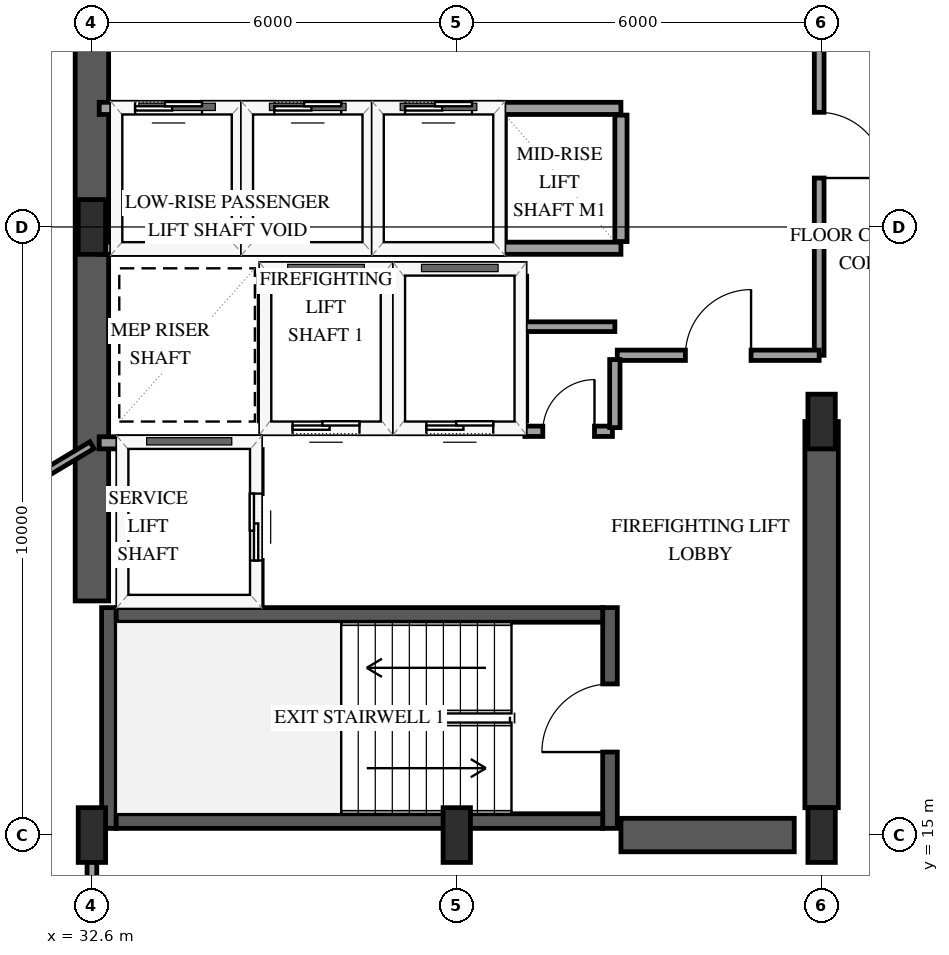
"""IFC4 building model, lengths in metres.
Left out: names, types, materials, properties, quantities, classifications, styles, units other than length and angle.
Written with IfcOpenShell. Run it as: python <this file> out.ifc"""

import sys

from ifc_helpers import new_model, si_unit, direction, frame, frame_2d, origin, origin_2d, place, context, subcontext, project, spatial, rectangle, extrude, element, fill, save


model = new_model("IFC4")
c1 = context("Model", 3, precision=1e-05, world=origin(), true_north=direction((0.0, 1.0)))
c2 = subcontext(c1, "Body", "Model", "MODEL_VIEW")
j1 = project(units=[si_unit("LENGTHUNIT", "METRE"), si_unit("PLANEANGLEUNIT", "RADIAN")], contexts=[c1])
p1 = place(None, origin())
s1 = spatial("IfcSite", under=j1, at=p1, CompositionType="ELEMENT")
p2 = place(p1, origin())
s2 = spatial("IfcBuilding", under=s1, at=p2, CompositionType="ELEMENT")
p3 = place(p2, frame((0.0, 0.0, 118.6)))
s3 = spatial("IfcBuildingStorey", under=s2, at=p3, CompositionType="ELEMENT", Elevation=118.6)
p4 = place(p3, frame((32.88, 15.11, 0.0), z_axis=(0.0, 0.0, 1.0), x_axis=(0.0, 1.0, 0.0)))
e1 = element("IfcWall", 1, at=p4, inside=s3, PredefinedType="SHEAR", context=c2, shape_type="SweptSolid", body=[
    extrude(rectangle(XDim=3.63, YDim=0.24, at=frame_2d((1.815, 0.0))), origin(), (0.0, 0.0, 1.0), 3.9),
])
p5 = place(p3, frame((41.12, 15.11, 0.0), z_axis=(0.0, 0.0, 1.0), x_axis=(0.0, 1.0, 0.0)))
e2 = element("IfcWall", 2, at=p5, inside=s3, PredefinedType="SHEAR", context=c2, shape_type="SweptSolid", body=[
    extrude(rectangle(XDim=3.63, YDim=0.24, at=frame_2d((1.815, 0.0))), origin(), (0.0, 0.0, 1.0), 3.9),
])
p6 = place(p5, frame((1.255, 0.0, 0.0)))
e3 = element("IfcOpeningElement", 3, at=p6, cuts=e2, PredefinedType="OPENING", context=c2, shape_type="SweptSolid", body=[
    extrude(rectangle(XDim=1.12, YDim=2.15, at=frame_2d((0.56, 1.075))), frame((0.0, 0.13, 0.0), z_axis=(0.0, -1.0, 0.0), x_axis=(1.0, 0.0, 0.0)), (0.0, 0.0, 1.0), 0.26),
])
for number, where, z_axis, x_axis in (
    (4, (33.0, 15.23, 0.0), (0.0, 0.0, 1.0), (1.0, 0.0, 0.0)),
    (5, (33.0, 18.62, 0.0), (0.0, 0.0, 1.0), (1.0, 0.0, 0.0)),
):
    element("IfcWall", number, at=place(p3, frame(where, z_axis=z_axis, x_axis=x_axis)), inside=s3, PredefinedType="SHEAR", context=c2, shape_type="SweptSolid", body=[
        extrude(rectangle(XDim=8.0, YDim=0.24, at=frame_2d((4.0, 0.0))), origin(), (0.0, 0.0, 1.0), 3.9),
    ])
p7 = place(p3, frame((32.6, 18.85, 0.0), z_axis=(0.0, 0.0, 1.0), x_axis=(0.0, 1.0, 0.0)))
e6 = element("IfcWall", 6, at=p7, inside=s3, PredefinedType="SHEAR", context=c2, shape_type="SweptSolid", body=[
    extrude(rectangle(XDim=12.3, YDim=0.55, at=frame_2d((6.15, 0.0))), origin(), (0.0, 0.0, 1.0), 3.9),
])
p8 = place(p3, frame((41.3, 15.0, 0.0), z_axis=(0.0, 0.0, 1.0), x_axis=(1.0, 0.0, 0.0)))
e7 = element("IfcWall", 7, at=p8, inside=s3, PredefinedType="SHEAR", context=c2, shape_type="SweptSolid", body=[
    extrude(rectangle(XDim=2.85, YDim=0.55, at=frame_2d((1.425, 0.0))), origin(), (0.0, 0.0, 1.0), 3.9),
])
p9 = place(p3, frame((44.6, 15.45, 0.0), z_axis=(0.0, 0.0, 1.0), x_axis=(0.0, 1.0, 0.0)))
e8 = element("IfcWall", 8, at=p9, inside=s3, PredefinedType="SHEAR", context=c2, shape_type="SweptSolid", body=[
    extrude(rectangle(XDim=6.35, YDim=0.55, at=frame_2d((3.175, 0.0))), origin(), (0.0, 0.0, 1.0), 3.9),
])
for number, where, z_axis, x_axis in (
    (9, (32.6, 15.0, 0.0), (0.0, 0.0, 1.0), (1.0, 0.0, 0.0)),
    (10, (32.6, 25.0, 0.0), (0.0, 0.0, 1.0), (1.0, 0.0, 0.0)),
    (11, (38.6, 15.0, 0.0), (0.0, 0.0, 1.0), (1.0, 0.0, 0.0)),
    (12, (44.6, 15.0, 0.0), (0.0, 0.0, 1.0), (1.0, 0.0, 0.0)),
    (13, (44.6, 21.8, 0.0), (0.0, 0.0, 1.0), (1.0, 0.0, 0.0)),
):
    element("IfcColumn", number, at=place(p3, frame(where, z_axis=z_axis, x_axis=x_axis)), inside=s3, PredefinedType="PILASTER", context=c2, shape_type="SweptSolid", body=[
        extrude(rectangle(XDim=0.45, YDim=0.9, at=origin_2d()), origin(), (0.0, 0.0, 1.0), 3.9),
    ])
p10 = place(p3, frame((35.45, 21.7, 0.0), z_axis=(0.0, 0.0, 1.0), x_axis=(1.0, 0.0, 0.0)))
e14 = element("IfcWall", 14, at=p10, inside=s3, PredefinedType="SOLIDWALL", context=c2, shape_type="SweptSolid", body=[
    extrude(rectangle(XDim=2.0, YDim=0.2, at=frame_2d((1.0, 0.0))), origin(), (0.0, 0.0, 1.0), 3.6),
])
p11 = place(p10, frame((0.45, 0.0, 0.0)))
e15 = element("IfcOpeningElement", 15, at=p11, cuts=e14, PredefinedType="OPENING", context=c2, shape_type="SweptSolid", body=[
    extrude(rectangle(XDim=1.1, YDim=2.15, at=frame_2d((0.55, 1.075))), frame((0.0, 0.11, 0.0), z_axis=(0.0, -1.0, 0.0), x_axis=(1.0, 0.0, 0.0)), (0.0, 0.0, 1.0), 0.22),
])
p12 = place(p3, frame((35.45, 24.3, 0.0), z_axis=(0.0, 0.0, 1.0), x_axis=(1.0, 0.0, 0.0)))
e16 = element("IfcWall", 16, at=p12, inside=s3, PredefinedType="SOLIDWALL", context=c2, shape_type="SweptSolid", body=[
    extrude(rectangle(XDim=2.0, YDim=0.2, at=frame_2d((1.0, 0.0))), origin(), (0.0, 0.0, 1.0), 3.6),
])
for number, where, z_axis, x_axis in (
    (17, (35.45, 21.81, 0.0), (0.0, 0.0, 1.0), (0.0, 1.0, 0.0)),
    (18, (37.45, 21.81, 0.0), (0.0, 0.0, 1.0), (0.0, 1.0, 0.0)),
):
    element("IfcWall", number, at=place(p3, frame(where, z_axis=z_axis, x_axis=x_axis)), inside=s3, PredefinedType="SOLIDWALL", context=c2, shape_type="SweptSolid", body=[
        extrude(rectangle(XDim=2.38, YDim=0.2, at=frame_2d((1.19, 0.0))), origin(), (0.0, 0.0, 1.0), 3.6),
    ])
p13 = place(p3, frame((37.65, 21.7, 0.0), z_axis=(0.0, 0.0, 1.0), x_axis=(1.0, 0.0, 0.0)))
e19 = element("IfcWall", 19, at=p13, inside=s3, PredefinedType="SOLIDWALL", context=c2, shape_type="SweptSolid", body=[
    extrude(rectangle(XDim=2.0, YDim=0.2, at=frame_2d((1.0, 0.0))), origin(), (0.0, 0.0, 1.0), 3.6),
])
p14 = place(p13, frame((0.45, 0.0, 0.0)))
e20 = element("IfcOpeningElement", 20, at=p14, cuts=e19, PredefinedType="OPENING", context=c2, shape_type="SweptSolid", body=[
    extrude(rectangle(XDim=1.1, YDim=2.15, at=frame_2d((0.55, 1.075))), frame((0.0, 0.11, 0.0), z_axis=(0.0, -1.0, 0.0), x_axis=(1.0, 0.0, 0.0)), (0.0, 0.0, 1.0), 0.22),
])
p15 = place(p3, frame((37.65, 24.3, 0.0), z_axis=(0.0, 0.0, 1.0), x_axis=(1.0, 0.0, 0.0)))
e21 = element("IfcWall", 21, at=p15, inside=s3, PredefinedType="SOLIDWALL", context=c2, shape_type="SweptSolid", body=[
    extrude(rectangle(XDim=2.0, YDim=0.2, at=frame_2d((1.0, 0.0))), origin(), (0.0, 0.0, 1.0), 3.6),
])
p16 = place(p3, frame((39.65, 21.81, 0.0), z_axis=(0.0, 0.0, 1.0), x_axis=(0.0, 1.0, 0.0)))
e22 = element("IfcWall", 22, at=p16, inside=s3, PredefinedType="SOLIDWALL", context=c2, shape_type="SweptSolid", body=[
    extrude(rectangle(XDim=2.38, YDim=0.2, at=frame_2d((1.19, 0.0))), origin(), (0.0, 0.0, 1.0), 3.6),
])
p17 = place(p3, frame((32.72, 21.45, 0.0), z_axis=(0.0, 0.0, 1.0), x_axis=(1.0, 0.0, 0.0)))
e23 = element("IfcWall", 23, at=p17, inside=s3, PredefinedType="SOLIDWALL", context=c2, shape_type="SweptSolid", body=[
    extrude(rectangle(XDim=2.58, YDim=0.2, at=frame_2d((1.29, 0.0))), origin(), (0.0, 0.0, 1.0), 2.974),
])
p18 = place(p3, frame((35.3, 18.79, 0.0), z_axis=(0.0, 0.0, 1.0), x_axis=(0.0, 1.0, 0.0)))
e24 = element("IfcWall", 24, at=p18, inside=s3, PredefinedType="SOLIDWALL", context=c2, shape_type="SweptSolid", body=[
    extrude(rectangle(XDim=2.55, YDim=0.2, at=frame_2d((1.275, 0.0))), origin(), (0.0, 0.0, 1.0), 3.6),
])
p19 = place(p18, frame((0.725, 0.0, 0.0)))
e25 = element("IfcOpeningElement", 25, at=p19, cuts=e24, PredefinedType="OPENING", context=c2, shape_type="SweptSolid", body=[
    extrude(rectangle(XDim=1.1, YDim=2.15, at=frame_2d((0.55, 1.075))), frame((0.0, 0.11, 0.0), z_axis=(0.0, -1.0, 0.0), x_axis=(1.0, 0.0, 0.0)), (0.0, 0.0, 1.0), 0.22),
])
p20 = place(p3, frame((32.72, 24.65, 0.0), z_axis=(0.0, 0.0, 1.0), x_axis=(1.0, 0.0, 0.0)))
e26 = element("IfcWall", 26, at=p20, inside=s3, PredefinedType="SOLIDWALL", context=c2, shape_type="SweptSolid", body=[
    extrude(rectangle(XDim=2.28, YDim=0.2, at=frame_2d((1.14, 0.0))), origin(), (0.0, 0.0, 1.0), 3.6),
])
p21 = place(p3, frame((32.72, 26.95, 0.0), z_axis=(0.0, 0.0, 1.0), x_axis=(1.0, 0.0, 0.0)))
e27 = element("IfcWall", 27, at=p21, inside=s3, PredefinedType="SOLIDWALL", context=c2, shape_type="SweptSolid", body=[
    extrude(rectangle(XDim=2.28, YDim=0.2, at=frame_2d((1.14, 0.0))), origin(), (0.0, 0.0, 1.0), 3.6),
])
p22 = place(p21, frame((0.59, 0.0, 0.0)))
e28 = element("IfcOpeningElement", 28, at=p22, cuts=e27, PredefinedType="OPENING", context=c2, shape_type="SweptSolid", body=[
    extrude(rectangle(XDim=1.1, YDim=2.15, at=frame_2d((0.55, 1.075))), frame((0.0, 0.11, 0.0), z_axis=(0.0, -1.0, 0.0), x_axis=(1.0, 0.0, 0.0)), (0.0, 0.0, 1.0), 0.22),
])
p23 = place(p3, frame((35.0, 24.76, 0.0), z_axis=(0.0, 0.0, 1.0), x_axis=(0.0, 1.0, 0.0)))
e29 = element("IfcWall", 29, at=p23, inside=s3, PredefinedType="SOLIDWALL", context=c2, shape_type="SweptSolid", body=[
    extrude(rectangle(XDim=2.08, YDim=0.2, at=frame_2d((1.04, 0.0))), origin(), (0.0, 0.0, 1.0), 3.6),
])
p24 = place(p3, frame((35.15, 24.65, 0.0), z_axis=(0.0, 0.0, 1.0), x_axis=(1.0, 0.0, 0.0)))
e30 = element("IfcWall", 30, at=p24, inside=s3, PredefinedType="SOLIDWALL", context=c2, shape_type="SweptSolid", body=[
    extrude(rectangle(XDim=2.0, YDim=0.2, at=frame_2d((1.0, 0.0))), origin(), (0.0, 0.0, 1.0), 3.6),
])
p25 = place(p3, frame((35.15, 26.95, 0.0), z_axis=(0.0, 0.0, 1.0), x_axis=(1.0, 0.0, 0.0)))
e31 = element("IfcWall", 31, at=p25, inside=s3, PredefinedType="SOLIDWALL", context=c2, shape_type="SweptSolid", body=[
    extrude(rectangle(XDim=2.0, YDim=0.2, at=frame_2d((1.0, 0.0))), origin(), (0.0, 0.0, 1.0), 3.6),
])
p26 = place(p25, frame((0.45, 0.0, 0.0)))
e32 = element("IfcOpeningElement", 32, at=p26, cuts=e31, PredefinedType="OPENING", context=c2, shape_type="SweptSolid", body=[
    extrude(rectangle(XDim=1.1, YDim=2.15, at=frame_2d((0.55, 1.075))), frame((0.0, 0.11, 0.0), z_axis=(0.0, -1.0, 0.0), x_axis=(1.0, 0.0, 0.0)), (0.0, 0.0, 1.0), 0.22),
])
p27 = place(p3, frame((37.15, 24.76, 0.0), z_axis=(0.0, 0.0, 1.0), x_axis=(0.0, 1.0, 0.0)))
e33 = element("IfcWall", 33, at=p27, inside=s3, PredefinedType="SOLIDWALL", context=c2, shape_type="SweptSolid", body=[
    extrude(rectangle(XDim=2.08, YDim=0.2, at=frame_2d((1.04, 0.0))), origin(), (0.0, 0.0, 1.0), 3.6),
])
p28 = place(p3, frame((37.3, 24.65, 0.0), z_axis=(0.0, 0.0, 1.0), x_axis=(1.0, 0.0, 0.0)))
e34 = element("IfcWall", 34, at=p28, inside=s3, PredefinedType="SOLIDWALL", context=c2, shape_type="SweptSolid", body=[
    extrude(rectangle(XDim=2.0, YDim=0.2, at=frame_2d((1.0, 0.0))), origin(), (0.0, 0.0, 1.0), 3.6),
])
p29 = place(p3, frame((37.3, 26.95, 0.0), z_axis=(0.0, 0.0, 1.0), x_axis=(1.0, 0.0, 0.0)))
e35 = element("IfcWall", 35, at=p29, inside=s3, PredefinedType="SOLIDWALL", context=c2, shape_type="SweptSolid", body=[
    extrude(rectangle(XDim=2.0, YDim=0.2, at=frame_2d((1.0, 0.0))), origin(), (0.0, 0.0, 1.0), 3.6),
])
p30 = place(p29, frame((0.45, 0.0, 0.0)))
e36 = element("IfcOpeningElement", 36, at=p30, cuts=e35, PredefinedType="OPENING", context=c2, shape_type="SweptSolid", body=[
    extrude(rectangle(XDim=1.1, YDim=2.15, at=frame_2d((0.55, 1.075))), frame((0.0, 0.11, 0.0), z_axis=(0.0, -1.0, 0.0), x_axis=(1.0, 0.0, 0.0)), (0.0, 0.0, 1.0), 0.22),
])
p31 = place(p3, frame((39.3, 24.76, 0.0), z_axis=(0.0, 0.0, 1.0), x_axis=(0.0, 1.0, 0.0)))
e37 = element("IfcWall", 37, at=p31, inside=s3, PredefinedType="SOLIDWALL", context=c2, shape_type="SweptSolid", body=[
    extrude(rectangle(XDim=2.08, YDim=0.2, at=frame_2d((1.04, 0.0))), origin(), (0.0, 0.0, 1.0), 3.6),
])
for number, where, z_axis, x_axis in (
    (38, (39.3, 24.65, 0.0), (0.0, 0.0, 1.0), (1.0, 0.0, 0.0)),
    (39, (39.3, 26.95, 0.0), (0.0, 0.0, 1.0), (1.0, 0.0, 0.0)),
):
    element("IfcWall", number, at=place(p3, frame(where, z_axis=z_axis, x_axis=x_axis)), inside=s3, PredefinedType="SOLIDWALL", context=c2, shape_type="SweptSolid", body=[
        extrude(rectangle(XDim=2.0, YDim=0.2, at=frame_2d((1.0, 0.0))), origin(), (0.0, 0.0, 1.0), 3.6),
    ])
p32 = place(p3, frame((41.3, 24.76, 0.0), z_axis=(0.0, 0.0, 1.0), x_axis=(0.0, 1.0, 0.0)))
e40 = element("IfcWall", 40, at=p32, inside=s3, PredefinedType="SOLIDWALL", context=c2, shape_type="SweptSolid", body=[
    extrude(rectangle(XDim=2.08, YDim=0.2, at=frame_2d((1.04, 0.0))), origin(), (0.0, 0.0, 1.0), 3.6),
])
p33 = place(p3, frame((44.56, 29.8, 0.0), z_axis=(0.0, 0.0, 1.0), x_axis=(0.0, -1.0, 0.0)))
e41 = element("IfcWall", 41, at=p33, inside=s3, PredefinedType="PARTITIONING", context=c2, shape_type="SweptSolid", body=[
    extrude(rectangle(XDim=6.91, YDim=0.16, at=frame_2d((3.455, 0.0))), origin(), (0.0, 0.0, 1.0), 2.64),
])
p34 = place(p33, frame((2.915, 0.0, 0.0)))
e42 = element("IfcOpeningElement", 42, at=p34, cuts=e41, PredefinedType="OPENING", context=c2, shape_type="SweptSolid", body=[
    extrude(rectangle(XDim=1.08, YDim=2.15, at=frame_2d((0.54, 1.075))), frame((0.0, 0.09, 0.0), z_axis=(0.0, -1.0, 0.0), x_axis=(1.0, 0.0, 0.0)), (0.0, 0.0, 1.0), 0.18),
])
p35 = place(p3, frame((32.6, 21.411, 0.0), z_axis=(0.0, 0.0, 1.0), x_axis=(-0.858317966337, -0.513118181965, 0.0)))
e43 = element("IfcWall", 43, at=p35, inside=s3, PredefinedType="PARTITIONING", context=c2, shape_type="SweptSolid", body=[
    extrude(rectangle(XDim=5.554, YDim=0.13, at=frame_2d((2.777, 0.0))), origin(), (0.0, 0.0, 1.0), 2.978),
])
p36 = place(p3, frame((41.24, 22.89, 0.0), z_axis=(0.0, 0.0, 1.0), x_axis=(1.0, 0.0, 0.0)))
e44 = element("IfcWall", 44, at=p36, inside=s3, PredefinedType="PARTITIONING", context=c2, shape_type="SweptSolid", body=[
    extrude(rectangle(XDim=3.32, YDim=0.17, at=frame_2d((1.66, 0.0))), origin(), (0.0, 0.0, 1.0), 3.6),
])
p37 = place(p36, frame((1.12, 0.0, 0.0)))
e45 = element("IfcOpeningElement", 45, at=p37, cuts=e44, PredefinedType="OPENING", context=c2, shape_type="SweptSolid", body=[
    extrude(rectangle(XDim=1.08, YDim=2.15, at=frame_2d((0.54, 1.075))), frame((0.0, 0.095, 0.0), z_axis=(0.0, -1.0, 0.0), x_axis=(1.0, 0.0, 0.0)), (0.0, 0.0, 1.0), 0.19),
])
p38 = place(p3, frame((32.6, 12.167, 0.0), z_axis=(0.0, 0.0, 1.0), x_axis=(0.0, 1.0, 0.0)))
e46 = element("IfcWall", 46, at=p38, inside=s3, PredefinedType="PARTITIONING", context=c2, shape_type="SweptSolid", body=[
    extrude(rectangle(XDim=2.763, YDim=0.16, at=frame_2d((1.381, 0.0))), origin(), (0.0, 0.0, 1.0), 3.6),
])
p39 = place(p3, frame((39.72, 21.64, 0.0), z_axis=(0.0, 0.0, 1.0), x_axis=(1.0, 0.0, 0.0)))
e47 = element("IfcWall", 47, at=p39, inside=s3, PredefinedType="PARTITIONING", context=c2, shape_type="SweptSolid", body=[
    extrude(rectangle(XDim=1.44, YDim=0.17, at=frame_2d((0.72, 0.0))), origin(), (0.0, 0.0, 1.0), 3.6),
])
p40 = place(p39, frame((0.295, 0.0, 0.0)))
e48 = element("IfcOpeningElement", 48, at=p40, cuts=e47, PredefinedType="OPENING", context=c2, shape_type="SweptSolid", body=[
    extrude(rectangle(XDim=0.85, YDim=2.1, at=frame_2d((0.425, 1.05))), frame((0.0, 0.095, 0.0), z_axis=(0.0, -1.0, 0.0), x_axis=(1.0, 0.0, 0.0)), (0.0, 0.0, 1.0), 0.19),
])
p41 = place(p3, frame((41.2, 21.7, 0.0), z_axis=(0.0, 0.0, 1.0), x_axis=(0.0, 1.0, 0.0)))
e49 = element("IfcWall", 49, at=p41, inside=s3, PredefinedType="PARTITIONING", context=c2, shape_type="SweptSolid", body=[
    extrude(rectangle(XDim=1.12, YDim=0.17, at=frame_2d((0.56, 0.0))), origin(), (0.0, 0.0, 1.0), 3.6),
])
p42 = place(p3, frame((41.2, 23.36, 0.0), z_axis=(0.0, 0.0, 1.0), x_axis=(-1.0, 0.0, 0.0)))
e50 = element("IfcWall", 50, at=p42, inside=s3, PredefinedType="PARTITIONING", context=c2, shape_type="SweptSolid", body=[
    extrude(rectangle(XDim=1.48, YDim=0.16, at=frame_2d((0.74, 0.0))), origin(), (0.0, 0.0, 1.0), 3.6),
])
p43 = place(p11, origin())
e51 = element("IfcDoor", 51, at=p43, inside=s3, OperationType="SLIDING_TO_LEFT", PredefinedType="DOOR", context=c2, shape_type="SweptSolid", body=[
    extrude(rectangle(XDim=1.1, YDim=2.15, at=frame_2d((0.55, 1.075))), frame((0.0, 0.025, 0.0), z_axis=(0.0, -1.0, 0.0), x_axis=(1.0, 0.0, 0.0)), (0.0, 0.0, 1.0), 0.05),
])
fill(e15, e51)
p44 = place(p14, origin())
e52 = element("IfcDoor", 52, at=p44, inside=s3, OperationType="SLIDING_TO_LEFT", PredefinedType="DOOR", context=c2, shape_type="SweptSolid", body=[
    extrude(rectangle(XDim=1.1, YDim=2.15, at=frame_2d((0.55, 1.075))), frame((0.0, 0.025, 0.0), z_axis=(0.0, -1.0, 0.0), x_axis=(1.0, 0.0, 0.0)), (0.0, 0.0, 1.0), 0.05),
])
fill(e20, e52)
p45 = place(p19, origin())
e53 = element("IfcDoor", 53, at=p45, inside=s3, OperationType="SLIDING_TO_LEFT", PredefinedType="DOOR", context=c2, shape_type="SweptSolid", body=[
    extrude(rectangle(XDim=1.1, YDim=2.15, at=frame_2d((0.55, 1.075))), frame((0.0, 0.025, 0.0), z_axis=(0.0, -1.0, 0.0), x_axis=(1.0, 0.0, 0.0)), (0.0, 0.0, 1.0), 0.05),
])
fill(e25, e53)
p46 = place(p22, origin())
e54 = element("IfcDoor", 54, at=p46, inside=s3, OperationType="SLIDING_TO_LEFT", PredefinedType="DOOR", context=c2, shape_type="SweptSolid", body=[
    extrude(rectangle(XDim=1.1, YDim=2.15, at=frame_2d((0.55, 1.075))), frame((0.0, 0.025, 0.0), z_axis=(0.0, -1.0, 0.0), x_axis=(1.0, 0.0, 0.0)), (0.0, 0.0, 1.0), 0.05),
])
fill(e28, e54)
p47 = place(p26, origin())
e55 = element("IfcDoor", 55, at=p47, inside=s3, OperationType="SLIDING_TO_LEFT", PredefinedType="DOOR", context=c2, shape_type="SweptSolid", body=[
    extrude(rectangle(XDim=1.1, YDim=2.15, at=frame_2d((0.55, 1.075))), frame((0.0, 0.025, 0.0), z_axis=(0.0, -1.0, 0.0), x_axis=(1.0, 0.0, 0.0)), (0.0, 0.0, 1.0), 0.05),
])
fill(e32, e55)
p48 = place(p30, origin())
e56 = element("IfcDoor", 56, at=p48, inside=s3, OperationType="SLIDING_TO_LEFT", PredefinedType="DOOR", context=c2, shape_type="SweptSolid", body=[
    extrude(rectangle(XDim=1.1, YDim=2.15, at=frame_2d((0.55, 1.075))), frame((0.0, 0.025, 0.0), z_axis=(0.0, -1.0, 0.0), x_axis=(1.0, 0.0, 0.0)), (0.0, 0.0, 1.0), 0.05),
])
fill(e36, e56)
p49 = place(p6, origin())
e57 = element("IfcDoor", 57, at=p49, inside=s3, OperationType="SINGLE_SWING_LEFT", PredefinedType="DOOR", context=c2, shape_type="SweptSolid", body=[
    extrude(rectangle(XDim=1.12, YDim=2.15, at=frame_2d((0.56, 1.075))), frame((0.0, 0.025, 0.0), z_axis=(0.0, -1.0, 0.0), x_axis=(1.0, 0.0, 0.0)), (0.0, 0.0, 1.0), 0.05),
])
fill(e3, e57)
p50 = place(p34, origin())
e58 = element("IfcDoor", 58, at=p50, inside=s3, OperationType="SINGLE_SWING_RIGHT", PredefinedType="DOOR", context=c2, shape_type="SweptSolid", body=[
    extrude(rectangle(XDim=1.08, YDim=2.15, at=frame_2d((0.54, 1.075))), frame((0.0, 0.025, 0.0), z_axis=(0.0, -1.0, 0.0), x_axis=(1.0, 0.0, 0.0)), (0.0, 0.0, 1.0), 0.05),
])
fill(e42, e58)
p51 = place(p37, origin())
e59 = element("IfcDoor", 59, at=p51, inside=s3, OperationType="SINGLE_SWING_RIGHT", PredefinedType="DOOR", context=c2, shape_type="SweptSolid", body=[
    extrude(rectangle(XDim=1.08, YDim=2.15, at=frame_2d((0.54, 1.075))), frame((0.0, 0.025, 0.0), z_axis=(0.0, -1.0, 0.0), x_axis=(1.0, 0.0, 0.0)), (0.0, 0.0, 1.0), 0.05),
])
fill(e45, e59)
p52 = place(p40, origin())
e60 = element("IfcDoor", 60, at=p52, inside=s3, OperationType="SINGLE_SWING_RIGHT", PredefinedType="DOOR", context=c2, shape_type="SweptSolid", body=[
    extrude(rectangle(XDim=0.85, YDim=2.1, at=frame_2d((0.425, 1.05))), frame((0.0, 0.025, 0.0), z_axis=(0.0, -1.0, 0.0), x_axis=(1.0, 0.0, 0.0)), (0.0, 0.0, 1.0), 0.05),
])
fill(e48, e60)
save(model, sys.argv[1])
